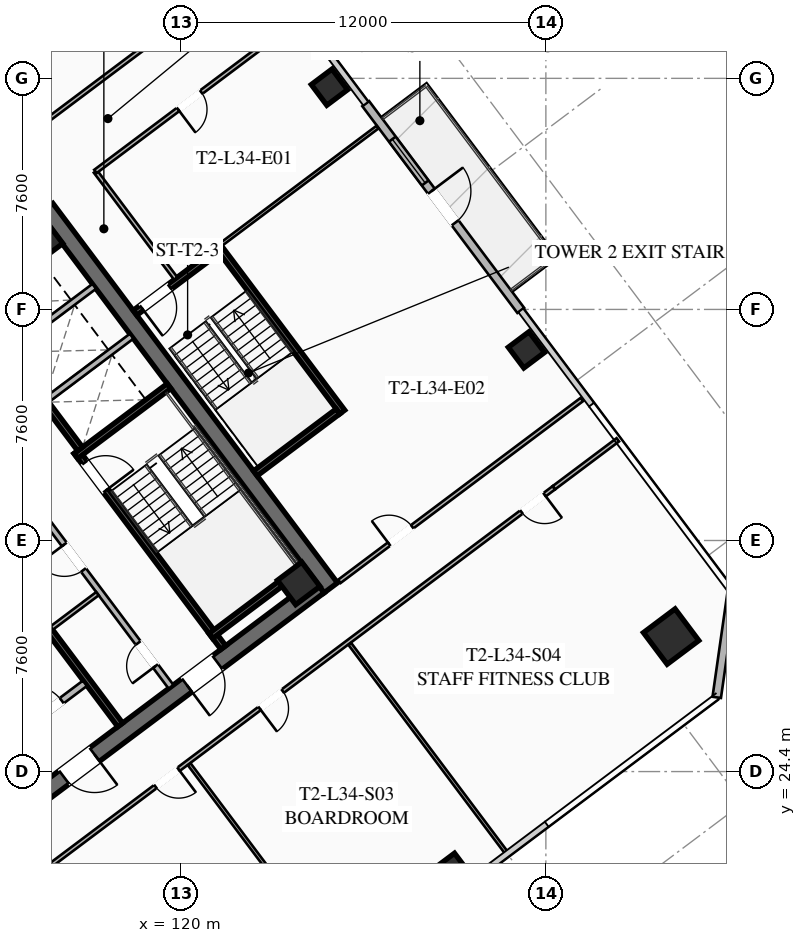
"""IFC4 building model, lengths in metres.
Left out: names, types, materials, properties, quantities, classifications, styles, units other than length and angle.
Written with IfcOpenShell. Run it as: python <this file> out.ifc"""

import sys

from ifc_helpers import new_model, si_unit, direction, frame, frame_2d, origin, origin_2d, place, context, subcontext, project, spatial, rectangle, hollow_rectangle, extrude, element, fill, save


model = new_model("IFC4")
c1 = context("Model", 3, precision=1e-05, world=origin(), true_north=direction((0.0, 1.0)))
c2 = subcontext(c1, "Body", "Model", "MODEL_VIEW")
j1 = project(units=[si_unit("LENGTHUNIT", "METRE"), si_unit("PLANEANGLEUNIT", "RADIAN")], contexts=[c1])
p1 = place(None, origin())
s1 = spatial("IfcSite", under=j1, at=p1, CompositionType="ELEMENT")
p2 = place(p1, origin())
s2 = spatial("IfcBuilding", under=s1, at=p2, CompositionType="ELEMENT")
p3 = place(p2, frame((0.0, 0.0, 128.6)))
s3 = spatial("IfcBuildingStorey", under=s2, at=p3, CompositionType="ELEMENT", Elevation=128.6)
p4 = place(p3, frame((115.564, 42.923, 0.0), z_axis=(0.0, 0.0, 1.0), x_axis=(0.600005007985, -0.799996243986, 0.0)))
e1 = element("IfcWall", 1, at=p4, inside=s3, PredefinedType="SHEAR", context=c2, shape_type="SweptSolid", body=[
    extrude(rectangle(XDim=15.6, YDim=0.55, at=frame_2d((7.8, 0.0))), origin(), (0.0, 0.0, 1.0), 3.55),
])
p5 = place(p3, frame((124.539, 30.498, 0.0), z_axis=(0.0, 0.0, 1.0), x_axis=(-0.799998054672, -0.600002593761, 0.0)))
e2 = element("IfcWall", 2, at=p5, inside=s3, PredefinedType="SHEAR", context=c2, shape_type="SweptSolid", body=[
    extrude(rectangle(XDim=15.06, YDim=0.55, at=frame_2d((7.53, 0.0))), origin(), (0.0, 0.0, 1.0), 3.55),
])
p6 = place(p5, frame((9.23, 0.0, 0.0)))
e3 = element("IfcOpeningElement", 3, at=p6, cuts=e2, PredefinedType="OPENING", context=c2, shape_type="SweptSolid", body=[
    extrude(rectangle(XDim=1.25, YDim=2.25, at=frame_2d((0.625, 1.125))), frame((0.0, 0.285, 0.0), z_axis=(0.0, -1.0, 0.0), x_axis=(1.0, 0.0, 0.0)), (0.0, 0.0, 1.0), 0.57),
])
p7 = place(p5, frame((4.18, 0.0, 0.0)))
e4 = element("IfcOpeningElement", 4, at=p7, cuts=e2, PredefinedType="OPENING", context=c2, shape_type="SweptSolid", body=[
    extrude(rectangle(XDim=1.25, YDim=2.25, at=frame_2d((0.625, 1.125))), frame((0.0, 0.285, 0.0), z_axis=(0.0, -1.0, 0.0), x_axis=(1.0, 0.0, 0.0)), (0.0, 0.0, 1.0), 0.57),
])
for number, where, z_axis, x_axis in (
    (5, (123.87, 30.59, 0.0), (0.0, 0.0, 1.0), (0.8, 0.6, 0.0)),
    (6, (115.41, 41.87, 0.0), (0.0, 0.0, 1.0), (0.8, 0.6, 0.0)),
):
    element("IfcColumn", number, at=place(p3, frame(where, z_axis=z_axis, x_axis=x_axis)), inside=s3, PredefinedType="COLUMN", context=c2, shape_type="SweptSolid", body=[
        extrude(hollow_rectangle(XDim=1.0, YDim=1.0, WallThickness=0.04, at=origin_2d()), origin(), (0.0, 0.0, 1.0), 3.37),
    ])
p8 = place(p3, frame((136.12, 28.84, 0.0), z_axis=(0.0, 0.0, 1.0), x_axis=(0.799999996291, 0.600000004945, 0.0)))
e7 = element("IfcColumn", 7, at=p8, inside=s3, PredefinedType="COLUMN", context=c2, shape_type="SweptSolid", body=[
    extrude(hollow_rectangle(XDim=1.3, YDim=1.3, WallThickness=0.05, at=origin_2d()), origin(), (0.0, 0.0, 1.0), 3.37),
])
for number, where, z_axis, x_axis in (
    (8, (128.91, 21.12, 0.0), (0.0, 0.0, 1.0), (0.8, 0.6, 0.0)),
    (9, (131.36, 38.27, 0.0), (0.0, 0.0, 1.0), (0.8, 0.6, 0.0)),
    (10, (124.88, 46.91, 0.0), (0.0, 0.0, 1.0), (0.8, 0.6, 0.0)),
):
    element("IfcColumn", number, at=place(p3, frame(where, z_axis=z_axis, x_axis=x_axis)), inside=s3, PredefinedType="COLUMN", context=c2, shape_type="SweptSolid", body=[
        extrude(hollow_rectangle(XDim=0.85, YDim=0.85, WallThickness=0.035, at=origin_2d()), origin(), (0.0, 0.0, 1.0), 3.37),
    ])
p9 = place(p3, frame((126.074, 46.368, 0.0), z_axis=(0.0, 0.0, 1.0), x_axis=(0.600018382406, -0.799986212866, 0.0)))
e11 = element("IfcWall", 11, at=p9, inside=s3, PredefinedType="SOLIDWALL", context=c2, shape_type="SweptSolid", body=[
    extrude(rectangle(XDim=8.5, YDim=0.28, at=frame_2d((4.25, 0.0))), origin(), (0.0, 0.0, 1.0), 3.37),
])
p10 = place(p9, frame((3.6, 0.0, 0.0)))
e12 = element("IfcOpeningElement", 12, at=p10, cuts=e11, PredefinedType="OPENING", context=c2, shape_type="SweptSolid", body=[
    extrude(rectangle(XDim=1.3, YDim=2.15, at=frame_2d((0.65, 1.075))), frame((0.0, 0.15, 0.0), z_axis=(0.0, -1.0, 0.0), x_axis=(1.0, 0.0, 0.0)), (0.0, 0.0, 1.0), 0.3),
])
p11 = place(p9, frame((1.46, 0.0, 0.85)))
e13 = element("IfcOpeningElement", 13, at=p11, cuts=e11, PredefinedType="OPENING", context=c2, shape_type="SweptSolid", body=[
    extrude(rectangle(XDim=1.8, YDim=1.92, at=frame_2d((0.9, 0.96))), frame((0.0, 0.15, 0.0), z_axis=(0.0, -1.0, 0.0), x_axis=(1.0, 0.0, 0.0)), (0.0, 0.0, 1.0), 0.3),
])
p12 = place(p3, frame((138.12, 30.34, 0.0), z_axis=(0.0, 0.0, 1.0), x_axis=(-0.141421356237, -0.989949493661, 0.0)))
e14 = element("IfcWall", 14, at=p12, inside=s3, PredefinedType="SOLIDWALL", context=c2, shape_type="SweptSolid", body=[
    extrude(rectangle(XDim=3.536, YDim=0.28, at=frame_2d((1.768, 0.0))), origin(), (0.0, 0.0, 1.0), 3.37),
])
p13 = place(p3, frame((116.56, 34.92, 0.0), z_axis=(0.0, 0.0, 1.0), x_axis=(0.59999029481, -0.8000072788, 0.0)))
e15 = element("IfcWall", 15, at=p13, inside=s3, PredefinedType="SHEAR", context=c2, shape_type="SweptSolid", body=[
    extrude(rectangle(XDim=8.05, YDim=0.2, at=frame_2d((4.025, 0.0))), origin(), (0.0, 0.0, 1.0), 3.37),
])
p14 = place(p13, frame((0.45, 0.0, 0.0)))
e16 = element("IfcOpeningElement", 16, at=p14, cuts=e15, PredefinedType="OPENING", context=c2, shape_type="SweptSolid", body=[
    extrude(rectangle(XDim=1.15, YDim=2.2, at=frame_2d((0.575, 1.1))), frame((0.0, 0.11, 0.0), z_axis=(0.0, -1.0, 0.0), x_axis=(1.0, 0.0, 0.0)), (0.0, 0.0, 1.0), 0.22),
])
for number, where, z_axis, x_axis in (
    (17, (116.54, 34.78, 0.0), (0.0, 0.0, 1.0), (0.8, 0.6, 0.0)),
    (18, (120.98, 28.86, 0.0), (0.0, 0.0, 1.0), (0.8, 0.6, 0.0)),
):
    element("IfcWall", number, at=place(p3, frame(where, z_axis=z_axis, x_axis=x_axis)), inside=s3, PredefinedType="SHEAR", context=c2, shape_type="SweptSolid", body=[
        extrude(rectangle(XDim=3.83, YDim=0.2, at=frame_2d((1.915, 0.0))), origin(), (0.0, 0.0, 1.0), 3.37),
    ])
p15 = place(p3, frame((117.998, 25.936, 0.0), z_axis=(0.0, 0.0, 1.0), x_axis=(-0.600002693989, 0.799997979501, 0.0)))
e19 = element("IfcWall", 19, at=p15, inside=s3, PredefinedType="SHEAR", context=c2, shape_type="SweptSolid", body=[
    extrude(rectangle(XDim=14.5, YDim=0.2, at=frame_2d((7.25, 0.0))), origin(), (0.0, 0.0, 1.0), 3.37),
])
p16 = place(p3, frame((114.316, 25.412, 0.0), z_axis=(0.0, 0.0, 1.0), x_axis=(0.800018601094, 0.59997519774, 0.0)))
e20 = element("IfcWall", 20, at=p16, inside=s3, PredefinedType="SOLIDWALL", context=c2, shape_type="SweptSolid", body=[
    extrude(rectangle(XDim=3.15, YDim=0.22, at=frame_2d((1.575, 0.0))), origin(), (0.0, 0.0, 1.0), 2.723),
])
p17 = place(p16, frame((0.95, 0.0, 0.0)))
e21 = element("IfcOpeningElement", 21, at=p17, cuts=e20, PredefinedType="OPENING", context=c2, shape_type="SweptSolid", body=[
    extrude(rectangle(XDim=1.25, YDim=2.25, at=frame_2d((0.625, 1.125))), frame((0.0, 0.12, 0.0), z_axis=(0.0, -1.0, 0.0), x_axis=(1.0, 0.0, 0.0)), (0.0, 0.0, 1.0), 0.24),
])
p18 = place(p3, frame((112.81, 40.17, 0.0), z_axis=(0.0, 0.0, 1.0), x_axis=(0.599993943644, -0.800004542231, 0.0)))
e22 = element("IfcWall", 22, at=p18, inside=s3, PredefinedType="SHEAR", context=c2, shape_type="SweptSolid", body=[
    extrude(rectangle(XDim=6.45, YDim=0.2, at=frame_2d((3.225, 0.0))), origin(), (0.0, 0.0, 1.0), 3.37),
])
for number, where, z_axis, x_axis in (
    (23, (115.59, 36.63, 0.0), (0.0, 0.0, 1.0), (0.8, 0.6, 0.0)),
    (24, (114.36, 38.27, 0.0), (0.0, 0.0, 1.0), (0.8, 0.6, 0.0)),
):
    element("IfcWall", number, at=place(p3, frame(where, z_axis=z_axis, x_axis=x_axis)), inside=s3, PredefinedType="SOLIDWALL", context=c2, shape_type="SweptSolid", body=[
        extrude(rectangle(XDim=3.48, YDim=0.2, at=frame_2d((1.74, 0.0))), origin(), (0.0, 0.0, 1.0), 3.37),
    ])
p19 = place(p3, frame((119.67, 27.19, 0.0), z_axis=(0.0, 0.0, 1.0), x_axis=(-0.599988677396, 0.800008491828, 0.0)))
e25 = element("IfcWall", 25, at=p19, inside=s3, PredefinedType="SOLIDWALL", context=c2, shape_type="SweptSolid", body=[
    extrude(rectangle(XDim=6.9, YDim=0.2, at=frame_2d((3.45, 0.0))), origin(), (0.0, 0.0, 1.0), 2.723),
])
p20 = place(p19, frame((0.85, 0.0, 0.0)))
e26 = element("IfcOpeningElement", 26, at=p20, cuts=e25, PredefinedType="OPENING", context=c2, shape_type="SweptSolid", body=[
    extrude(rectangle(XDim=0.95, YDim=2.05, at=frame_2d((0.475, 1.025))), frame((0.0, 0.11, 0.0), z_axis=(0.0, -1.0, 0.0), x_axis=(1.0, 0.0, 0.0)), (0.0, 0.0, 1.0), 0.22),
])
p21 = place(p19, frame((4.8, 0.0, 0.0)))
e27 = element("IfcOpeningElement", 27, at=p21, cuts=e25, PredefinedType="OPENING", context=c2, shape_type="SweptSolid", body=[
    extrude(rectangle(XDim=1.05, YDim=2.2, at=frame_2d((0.525, 1.1))), frame((0.0, 0.11, 0.0), z_axis=(0.0, -1.0, 0.0), x_axis=(1.0, 0.0, 0.0)), (0.0, 0.0, 1.0), 0.22),
])
p22 = place(p3, frame((115.746, 29.122, 0.0), z_axis=(0.0, 0.0, 1.0), x_axis=(0.8, 0.6, 0.0)))
e28 = element("IfcWall", 28, at=p22, inside=s3, PredefinedType="PARTITIONING", context=c2, shape_type="SweptSolid", body=[
    extrude(rectangle(XDim=1.88, YDim=0.135, at=frame_2d((0.94, 0.0))), origin(), (0.0, 0.0, 1.0), 2.723),
])
p23 = place(p3, frame((125.304, 36.228, 0.0), z_axis=(0.0, 0.0, 1.0), x_axis=(-0.59998851072, 0.800008616831, 0.0)))
e29 = element("IfcWall", 29, at=p23, inside=s3, PredefinedType="SHEAR", context=c2, shape_type="SweptSolid", body=[
    extrude(rectangle(XDim=6.8, YDim=0.2, at=frame_2d((3.4, 0.0))), origin(), (0.0, 0.0, 1.0), 3.37),
])
p24 = place(p3, frame((121.204, 41.528, 0.0), z_axis=(0.0, 0.0, 1.0), x_axis=(-0.800017232136, -0.599977023131, 0.0)))
e30 = element("IfcWall", 30, at=p24, inside=s3, PredefinedType="SHEAR", context=c2, shape_type="SweptSolid", body=[
    extrude(rectangle(XDim=3.4, YDim=0.2, at=frame_2d((1.7, 0.0))), origin(), (0.0, 0.0, 1.0), 3.37),
])
p25 = place(p24, frame((1.975, 0.0, 0.0)))
e31 = element("IfcOpeningElement", 31, at=p25, cuts=e30, PredefinedType="OPENING", context=c2, shape_type="SweptSolid", body=[
    extrude(rectangle(XDim=1.15, YDim=2.2, at=frame_2d((0.575, 1.1))), frame((0.0, 0.11, 0.0), z_axis=(0.0, -1.0, 0.0), x_axis=(1.0, 0.0, 0.0)), (0.0, 0.0, 1.0), 0.22),
])
p26 = place(p3, frame((122.444, 34.208, 0.0), z_axis=(0.0, 0.0, 1.0), x_axis=(0.79999138319, 0.600011488909, 0.0)))
e32 = element("IfcWall", 32, at=p26, inside=s3, PredefinedType="SHEAR", context=c2, shape_type="SweptSolid", body=[
    extrude(rectangle(XDim=3.4, YDim=0.2, at=frame_2d((1.7, 0.0))), origin(), (0.0, 0.0, 1.0), 3.37),
])
p27 = place(p3, frame((119.824, 40.618, 0.0), z_axis=(0.0, 0.0, 1.0), x_axis=(-0.599982243973, 0.800013316712, 0.0)))
e33 = element("IfcWall", 33, at=p27, inside=s3, PredefinedType="PARTITIONING", context=c2, shape_type="SweptSolid", body=[
    extrude(rectangle(XDim=4.4, YDim=0.135, at=frame_2d((2.2, 0.0))), origin(), (0.0, 0.0, 1.0), 2.723),
])
p28 = place(p3, frame((95.42, 30.69, 0.0), z_axis=(0.0, 0.0, 1.0), x_axis=(0.8, 0.6, 0.0)))
e34 = element("IfcWall", 34, at=p28, inside=s3, PredefinedType="PARTITIONING", context=c2, shape_type="SweptSolid", body=[
    extrude(rectangle(XDim=31.3, YDim=0.135, at=frame_2d((15.65, 0.0))), origin(), (0.0, 0.0, 1.0), 2.723),
])
p29 = place(p28, frame((0.3, 0.0, 0.0)))
e35 = element("IfcOpeningElement", 35, at=p29, cuts=e34, PredefinedType="OPENING", context=c2, shape_type="SweptSolid", body=[
    extrude(rectangle(XDim=0.95, YDim=2.05, at=frame_2d((0.475, 1.025))), frame((0.0, 0.077, 0.0), z_axis=(0.0, -1.0, 0.0), x_axis=(1.0, 0.0, 0.0)), (0.0, 0.0, 1.0), 0.155),
])
p30 = place(p28, frame((30.05, 0.0, 0.0)))
e36 = element("IfcOpeningElement", 36, at=p30, cuts=e34, PredefinedType="OPENING", context=c2, shape_type="SweptSolid", body=[
    extrude(rectangle(XDim=0.95, YDim=2.05, at=frame_2d((0.475, 1.025))), frame((0.0, 0.077, 0.0), z_axis=(0.0, -1.0, 0.0), x_axis=(1.0, 0.0, 0.0)), (0.0, 0.0, 1.0), 0.155),
])
p31 = place(p3, frame((132.262, 33.734, 0.0), z_axis=(0.0, 0.0, 1.0), x_axis=(-0.800003744006, -0.59999500796, 0.0)))
e37 = element("IfcWall", 37, at=p31, inside=s3, PredefinedType="PARTITIONING", context=c2, shape_type="SweptSolid", body=[
    extrude(rectangle(XDim=31.3, YDim=0.135, at=frame_2d((15.65, 0.0))), origin(), (0.0, 0.0, 1.0), 2.723),
])
p32 = place(p31, frame((29.97, 0.0, 0.0)))
e38 = element("IfcOpeningElement", 38, at=p32, cuts=e37, PredefinedType="OPENING", context=c2, shape_type="SweptSolid", body=[
    extrude(rectangle(XDim=0.95, YDim=2.05, at=frame_2d((0.475, 1.025))), frame((0.0, 0.077, 0.0), z_axis=(0.0, -1.0, 0.0), x_axis=(1.0, 0.0, 0.0)), (0.0, 0.0, 1.0), 0.155),
])
p33 = place(p31, frame((15.43, 0.0, 0.0)))
e39 = element("IfcOpeningElement", 39, at=p33, cuts=e37, PredefinedType="OPENING", context=c2, shape_type="SweptSolid", body=[
    extrude(rectangle(XDim=0.95, YDim=2.05, at=frame_2d((0.475, 1.025))), frame((0.0, 0.077, 0.0), z_axis=(0.0, -1.0, 0.0), x_axis=(1.0, 0.0, 0.0)), (0.0, 0.0, 1.0), 0.155),
])
p34 = place(p31, frame((11.146, 0.0, 0.0)))
e40 = element("IfcOpeningElement", 40, at=p34, cuts=e37, PredefinedType="OPENING", context=c2, shape_type="SweptSolid", body=[
    extrude(rectangle(XDim=0.95, YDim=2.05, at=frame_2d((0.475, 1.025))), frame((0.0, 0.077, 0.0), z_axis=(0.0, -1.0, 0.0), x_axis=(1.0, 0.0, 0.0)), (0.0, 0.0, 1.0), 0.155),
])
p35 = place(p31, frame((0.38, 0.0, 0.0)))
e41 = element("IfcOpeningElement", 41, at=p35, cuts=e37, PredefinedType="OPENING", context=c2, shape_type="SweptSolid", body=[
    extrude(rectangle(XDim=0.95, YDim=2.05, at=frame_2d((0.475, 1.025))), frame((0.0, 0.077, 0.0), z_axis=(0.0, -1.0, 0.0), x_axis=(1.0, 0.0, 0.0)), (0.0, 0.0, 1.0), 0.155),
])
p36 = place(p3, frame((132.262, 33.734, 0.0), z_axis=(0.0, 0.0, 1.0), x_axis=(0.799977721118, 0.600029704027, 0.0)))
e42 = element("IfcWall", 42, at=p36, inside=s3, PredefinedType="PARTITIONING", context=c2, shape_type="SweptSolid", body=[
    extrude(rectangle(XDim=2.63, YDim=0.135, at=frame_2d((1.315, 0.0))), origin(), (0.0, 0.0, 1.0), 2.723),
])
p37 = place(p3, frame((125.448, 17.736, 0.0), z_axis=(0.0, 0.0, 1.0), x_axis=(-0.600009052859, 0.799993210276, 0.0)))
e43 = element("IfcWall", 43, at=p37, inside=s3, PredefinedType="PARTITIONING", context=c2, shape_type="SweptSolid", body=[
    extrude(rectangle(XDim=8.63, YDim=0.11, at=frame_2d((4.315, 0.0))), origin(), (0.0, 0.0, 1.0), 2.723),
])
p38 = place(p3, frame((130.728, 21.696, 0.0), z_axis=(0.0, 0.0, 1.0), x_axis=(-0.599995473644, 0.800003394747, 0.0)))
e44 = element("IfcWall", 44, at=p38, inside=s3, PredefinedType="PARTITIONING", context=c2, shape_type="SweptSolid", body=[
    extrude(rectangle(XDim=8.63, YDim=0.11, at=frame_2d((4.315, 0.0))), origin(), (0.0, 0.0, 1.0), 2.723),
])
p39 = place(p3, frame((123.824, 49.118, 0.0), z_axis=(0.0, 0.0, 1.0), x_axis=(-0.799996470201, -0.60000470637, 0.0)))
e45 = element("IfcWall", 45, at=p39, inside=s3, PredefinedType="PARTITIONING", context=c2, shape_type="SweptSolid", body=[
    extrude(rectangle(XDim=8.3, YDim=0.135, at=frame_2d((4.15, 0.0))), origin(), (0.0, 0.0, 1.0), 2.723),
])
p40 = place(p39, frame((3.95, 0.0, 0.0)))
e46 = element("IfcOpeningElement", 46, at=p40, cuts=e45, PredefinedType="OPENING", context=c2, shape_type="SweptSolid", body=[
    extrude(rectangle(XDim=0.95, YDim=2.05, at=frame_2d((0.475, 1.025))), frame((0.0, 0.077, 0.0), z_axis=(0.0, -1.0, 0.0), x_axis=(1.0, 0.0, 0.0)), (0.0, 0.0, 1.0), 0.155),
])
p41 = place(p3, frame((125.208, 30.656, 0.0), z_axis=(0.0, 0.0, 1.0), x_axis=(0.800005876956, 0.599992163979, 0.0)))
e47 = element("IfcWall", 47, at=p41, inside=s3, PredefinedType="PARTITIONING", context=c2, shape_type="SweptSolid", body=[
    extrude(rectangle(XDim=9.97, YDim=0.135, at=frame_2d((4.985, 0.0))), origin(), (0.0, 0.0, 1.0), 2.723),
])
p42 = place(p41, frame((2.045, 0.0, 0.0)))
e48 = element("IfcOpeningElement", 48, at=p42, cuts=e47, PredefinedType="OPENING", context=c2, shape_type="SweptSolid", body=[
    extrude(rectangle(XDim=0.95, YDim=2.05, at=frame_2d((0.475, 1.025))), frame((0.0, 0.077, 0.0), z_axis=(0.0, -1.0, 0.0), x_axis=(1.0, 0.0, 0.0)), (0.0, 0.0, 1.0), 0.155),
])
p43 = place(p3, frame((126.464, 45.598, 0.0), z_axis=(0.0, 0.0, 1.0), x_axis=(-0.8000181681, -0.599975775102, 0.0)))
e49 = element("IfcWall", 49, at=p43, inside=s3, PredefinedType="PARTITIONING", context=c2, shape_type="SweptSolid", body=[
    extrude(rectangle(XDim=6.45, YDim=0.11, at=frame_2d((3.225, 0.0))), origin(), (0.0, 0.0, 1.0), 2.723),
])
p44 = place(p10, origin())
e50 = element("IfcDoor", 50, at=p44, inside=s3, OperationType="SINGLE_SWING_LEFT", PredefinedType="DOOR", context=c2, shape_type="SweptSolid", body=[
    extrude(rectangle(XDim=1.3, YDim=2.15, at=frame_2d((0.65, 1.075))), frame((0.0, 0.025, 0.0), z_axis=(0.0, -1.0, 0.0), x_axis=(1.0, 0.0, 0.0)), (0.0, 0.0, 1.0), 0.05),
])
fill(e12, e50)
p45 = place(p11, origin())
e51 = element("IfcWindow", 51, at=p45, inside=s3, PartitioningType="SINGLE_PANEL", PredefinedType="WINDOW", context=c2, shape_type="SweptSolid", body=[
    extrude(rectangle(XDim=1.8, YDim=1.92, at=frame_2d((0.9, 0.96))), frame((0.0, 0.03, 0.0), z_axis=(0.0, -1.0, 0.0), x_axis=(1.0, 0.0, 0.0)), (0.0, 0.0, 1.0), 0.06),
])
fill(e13, e51)
p46 = place(p6, origin())
e52 = element("IfcDoor", 52, at=p46, inside=s3, OperationType="SINGLE_SWING_LEFT", PredefinedType="DOOR", context=c2, shape_type="SweptSolid", body=[
    extrude(rectangle(XDim=1.25, YDim=2.25, at=frame_2d((0.625, 1.125))), frame((0.0, 0.025, 0.0), z_axis=(0.0, -1.0, 0.0), x_axis=(1.0, 0.0, 0.0)), (0.0, 0.0, 1.0), 0.05),
])
fill(e3, e52)
p47 = place(p7, origin())
e53 = element("IfcDoor", 53, at=p47, inside=s3, OperationType="SINGLE_SWING_RIGHT", PredefinedType="DOOR", context=c2, shape_type="SweptSolid", body=[
    extrude(rectangle(XDim=1.25, YDim=2.25, at=frame_2d((0.625, 1.125))), frame((0.0, 0.025, 0.0), z_axis=(0.0, -1.0, 0.0), x_axis=(1.0, 0.0, 0.0)), (0.0, 0.0, 1.0), 0.05),
])
fill(e4, e53)
p48 = place(p14, origin())
e54 = element("IfcDoor", 54, at=p48, inside=s3, OperationType="SINGLE_SWING_RIGHT", PredefinedType="DOOR", context=c2, shape_type="SweptSolid", body=[
    extrude(rectangle(XDim=1.15, YDim=2.2, at=frame_2d((0.575, 1.1))), frame((0.0, 0.025, 0.0), z_axis=(0.0, -1.0, 0.0), x_axis=(1.0, 0.0, 0.0)), (0.0, 0.0, 1.0), 0.05),
])
fill(e16, e54)
p49 = place(p17, origin())
e55 = element("IfcDoor", 55, at=p49, inside=s3, OperationType="SINGLE_SWING_LEFT", PredefinedType="DOOR", context=c2, shape_type="SweptSolid", body=[
    extrude(rectangle(XDim=1.25, YDim=2.25, at=frame_2d((0.625, 1.125))), frame((0.0, 0.025, 0.0), z_axis=(0.0, -1.0, 0.0), x_axis=(1.0, 0.0, 0.0)), (0.0, 0.0, 1.0), 0.05),
])
fill(e21, e55)
p50 = place(p20, origin())
e56 = element("IfcDoor", 56, at=p50, inside=s3, OperationType="SINGLE_SWING_LEFT", PredefinedType="DOOR", context=c2, shape_type="SweptSolid", body=[
    extrude(rectangle(XDim=0.95, YDim=2.05, at=frame_2d((0.475, 1.025))), frame((0.0, 0.025, 0.0), z_axis=(0.0, -1.0, 0.0), x_axis=(1.0, 0.0, 0.0)), (0.0, 0.0, 1.0), 0.05),
])
fill(e26, e56)
p51 = place(p21, origin())
e57 = element("IfcDoor", 57, at=p51, inside=s3, OperationType="SINGLE_SWING_RIGHT", PredefinedType="DOOR", context=c2, shape_type="SweptSolid", body=[
    extrude(rectangle(XDim=1.05, YDim=2.2, at=frame_2d((0.525, 1.1))), frame((0.0, 0.025, 0.0), z_axis=(0.0, -1.0, 0.0), x_axis=(1.0, 0.0, 0.0)), (0.0, 0.0, 1.0), 0.05),
])
fill(e27, e57)
p52 = place(p25, origin())
e58 = element("IfcDoor", 58, at=p52, inside=s3, OperationType="SINGLE_SWING_RIGHT", PredefinedType="DOOR", context=c2, shape_type="SweptSolid", body=[
    extrude(rectangle(XDim=1.15, YDim=2.2, at=frame_2d((0.575, 1.1))), frame((0.0, 0.025, 0.0), z_axis=(0.0, -1.0, 0.0), x_axis=(1.0, 0.0, 0.0)), (0.0, 0.0, 1.0), 0.05),
])
fill(e31, e58)
p53 = place(p33, origin())
e59 = element("IfcDoor", 59, at=p53, inside=s3, OperationType="SINGLE_SWING_LEFT", PredefinedType="DOOR", context=c2, shape_type="SweptSolid", body=[
    extrude(rectangle(XDim=0.95, YDim=2.05, at=frame_2d((0.475, 1.025))), frame((0.0, 0.025, 0.0), z_axis=(0.0, -1.0, 0.0), x_axis=(1.0, 0.0, 0.0)), (0.0, 0.0, 1.0), 0.05),
])
fill(e39, e59)
p54 = place(p34, origin())
e60 = element("IfcDoor", 60, at=p54, inside=s3, OperationType="SINGLE_SWING_RIGHT", PredefinedType="DOOR", context=c2, shape_type="SweptSolid", body=[
    extrude(rectangle(XDim=0.95, YDim=2.05, at=frame_2d((0.475, 1.025))), frame((0.0, 0.025, 0.0), z_axis=(0.0, -1.0, 0.0), x_axis=(1.0, 0.0, 0.0)), (0.0, 0.0, 1.0), 0.05),
])
fill(e40, e60)
p55 = place(p35, origin())
e61 = element("IfcDoor", 61, at=p55, inside=s3, OperationType="SINGLE_SWING_LEFT", PredefinedType="DOOR", context=c2, shape_type="SweptSolid", body=[
    extrude(rectangle(XDim=0.95, YDim=2.05, at=frame_2d((0.475, 1.025))), frame((0.0, 0.025, 0.0), z_axis=(0.0, -1.0, 0.0), x_axis=(1.0, 0.0, 0.0)), (0.0, 0.0, 1.0), 0.05),
])
fill(e41, e61)
p56 = place(p40, origin())
e62 = element("IfcDoor", 62, at=p56, inside=s3, OperationType="SINGLE_SWING_RIGHT", PredefinedType="DOOR", context=c2, shape_type="SweptSolid", body=[
    extrude(rectangle(XDim=0.95, YDim=2.05, at=frame_2d((0.475, 1.025))), frame((0.0, 0.025, 0.0), z_axis=(0.0, -1.0, 0.0), x_axis=(1.0, 0.0, 0.0)), (0.0, 0.0, 1.0), 0.05),
])
fill(e46, e62)
p57 = place(p42, origin())
e63 = element("IfcDoor", 63, at=p57, inside=s3, OperationType="SINGLE_SWING_LEFT", PredefinedType="DOOR", context=c2, shape_type="SweptSolid", body=[
    extrude(rectangle(XDim=0.95, YDim=2.05, at=frame_2d((0.475, 1.025))), frame((0.0, 0.025, 0.0), z_axis=(0.0, -1.0, 0.0), x_axis=(1.0, 0.0, 0.0)), (0.0, 0.0, 1.0), 0.05),
])
fill(e48, e63)
save(model, sys.argv[1])
